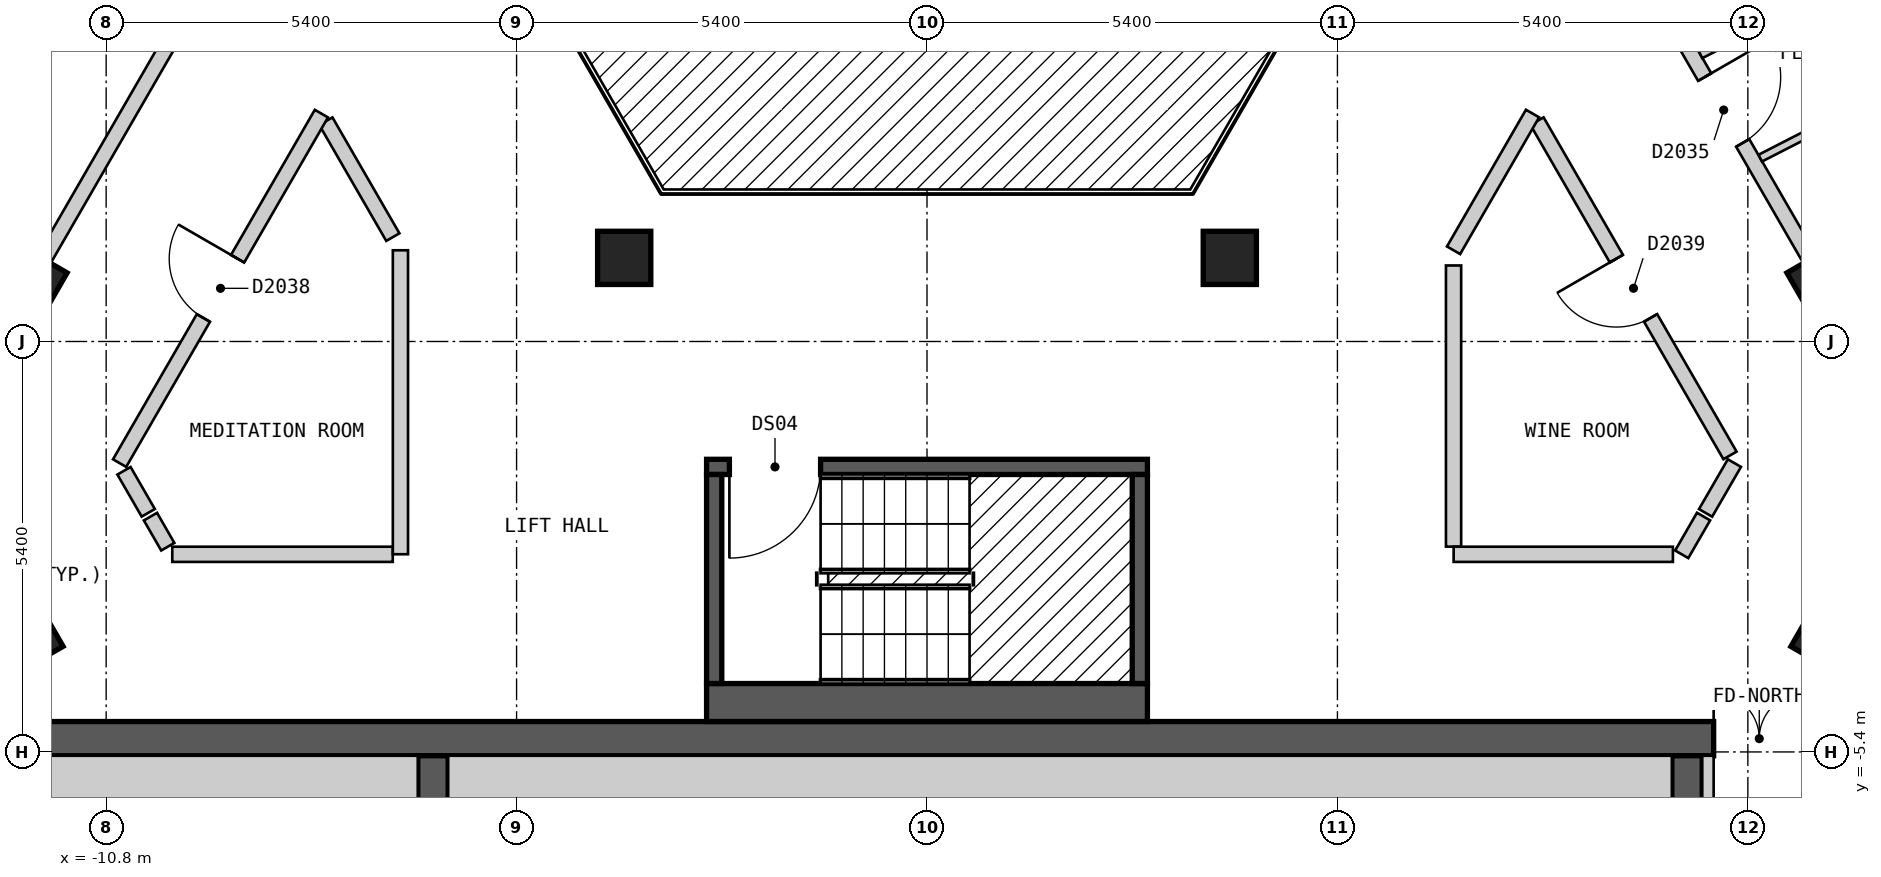
"""IFC4 building model, lengths in metres.
Left out: names, types, materials, properties, quantities, classifications, styles, units other than length and angle.
Written with IfcOpenShell. Run it as: python <this file> out.ifc"""

import sys

from ifc_helpers import new_model, si_unit, direction, frame, frame_2d, origin, origin_2d, place, context, subcontext, project, spatial, rectangle, extrude, element, fill, save


model = new_model("IFC4")
c1 = context("Model", 3, precision=1e-05, world=origin(), true_north=direction((0.0, 1.0)))
c2 = subcontext(c1, "Body", "Model", "MODEL_VIEW")
j1 = project(units=[si_unit("LENGTHUNIT", "METRE"), si_unit("PLANEANGLEUNIT", "RADIAN")], contexts=[c1])
p1 = place(None, origin())
s1 = spatial("IfcSite", under=j1, at=p1, CompositionType="ELEMENT")
p2 = place(p1, origin())
s2 = spatial("IfcBuilding", under=s1, at=p2, CompositionType="ELEMENT")
p3 = place(p2, frame((0.0, 0.0, 238.8)))
s3 = spatial("IfcBuildingStorey", under=s2, at=p3, CompositionType="ELEMENT", Elevation=238.8)
for number, where, z_axis, x_axis in (
    (1, (-11.845, -3.883, 0.0), (0.0, 0.0, 1.0), (0.5, -0.866, 0.0)),
    (2, (11.845, -3.884, 0.0), (0.0, 0.0, 1.0), (0.5, 0.866, 0.0)),
    (3, (11.792, 0.775, 0.0), (0.0, 0.0, 1.0), (-0.5, 0.866, 0.0)),
    (4, (3.984, 1.1, 0.0), (0.0, 0.0, 1.0), (1.0, 0.0, 0.0)),
    (5, (-3.984, 1.1, 0.0), (0.0, 0.0, 1.0), (1.0, 0.0, 0.0)),
    (6, (-11.792, 0.775, 0.0), (0.0, 0.0, 1.0), (-0.5, -0.866, 0.0)),
):
    element("IfcColumn", number, at=place(p3, frame(where, z_axis=z_axis, x_axis=x_axis)), inside=s3, PredefinedType="COLUMN", context=c2, shape_type="SweptSolid", body=[
        extrude(rectangle(XDim=0.7, YDim=0.7, at=origin_2d()), origin(), (0.0, 0.0, 1.0), 3.0),
    ])
p4 = place(p3, frame((-13.3, -5.225, 0.0), z_axis=(0.0, 0.0, 1.0), x_axis=(1.0, 0.0, 0.0)))
e7 = element("IfcWall", 7, at=p4, inside=s3, PredefinedType="SHEAR", context=c2, shape_type="SweptSolid", body=[
    extrude(rectangle(XDim=26.6, YDim=0.45, at=frame_2d((13.3, 0.0))), origin(), (0.0, 0.0, 1.0), 2.7),
])
p5 = place(p4, frame((23.65, 0.0, 0.0)))
e8 = element("IfcOpeningElement", 8, at=p5, cuts=e7, PredefinedType="OPENING", context=c2, shape_type="SweptSolid", body=[
    extrude(rectangle(XDim=1.2, YDim=2.1, at=frame_2d((0.6, 1.05))), frame((0.0, 0.235, 0.0), z_axis=(0.0, -1.0, 0.0), x_axis=(1.0, 0.0, 0.0)), (0.0, 0.0, 1.0), 0.47),
])
for number, where, z_axis, x_axis in (
    (9, (-6.5, -9.15, 0.0), (0.0, 0.0, 1.0), (0.0, 1.0, 0.0)),
    (10, (10.0, -9.15, 0.0), (0.0, 0.0, 1.0), (0.0, 1.0, 0.0)),
):
    element("IfcWall", number, at=place(p3, frame(where, z_axis=z_axis, x_axis=x_axis)), inside=s3, PredefinedType="SHEAR", context=c2, shape_type="SweptSolid", body=[
        extrude(rectangle(XDim=3.7, YDim=0.4, at=frame_2d((1.85, 0.0))), origin(), (0.0, 0.0, 1.0), 2.7),
    ])
p6 = place(p3, frame((-2.9, -4.75, 0.0), z_axis=(0.0, 0.0, 1.0), x_axis=(1.0, 0.0, 0.0)))
e11 = element("IfcWall", 11, at=p6, inside=s3, PredefinedType="SOLIDWALL", context=c2, shape_type="SweptSolid", body=[
    extrude(rectangle(XDim=5.8, YDim=0.5, at=frame_2d((2.9, 0.0))), origin(), (0.0, 0.0, 1.0), 2.7),
])
p7 = place(p3, frame((-2.9, -1.65, 0.0), z_axis=(0.0, 0.0, 1.0), x_axis=(1.0, 0.0, 0.0)))
e12 = element("IfcWall", 12, at=p7, inside=s3, PredefinedType="SOLIDWALL", context=c2, shape_type="SweptSolid", body=[
    extrude(rectangle(XDim=5.8, YDim=0.2, at=frame_2d((2.9, 0.0))), origin(), (0.0, 0.0, 1.0), 2.7),
])
p8 = place(p7, frame((0.3, 0.0, 0.0)))
e13 = element("IfcOpeningElement", 13, at=p8, cuts=e12, PredefinedType="OPENING", context=c2, shape_type="SweptSolid", body=[
    extrude(rectangle(XDim=1.2, YDim=2.1, at=frame_2d((0.6, 1.05))), frame((0.0, 0.11, 0.0), z_axis=(0.0, -1.0, 0.0), x_axis=(1.0, 0.0, 0.0)), (0.0, 0.0, 1.0), 0.22),
])
for number, where, z_axis, x_axis in (
    (14, (-2.8, -4.5, 0.0), (0.0, 0.0, 1.0), (0.0, 1.0, 0.0)),
    (15, (2.8, -4.5, 0.0), (0.0, 0.0, 1.0), (0.0, 1.0, 0.0)),
):
    element("IfcWall", number, at=place(p3, frame(where, z_axis=z_axis, x_axis=x_axis)), inside=s3, PredefinedType="SOLIDWALL", context=c2, shape_type="SweptSolid", body=[
        extrude(rectangle(XDim=2.75, YDim=0.2, at=frame_2d((1.375, 0.0))), origin(), (0.0, 0.0, 1.0), 2.7),
    ])
p9 = place(p3, frame((-7.909, 2.898, 0.0), z_axis=(0.0, 0.0, 1.0), x_axis=(0.50019444547, -0.865913111531, 0.0)))
e16 = element("IfcWall", 16, at=p9, inside=s3, PredefinedType="PARTITIONING", context=c2, shape_type="SweptSolid", body=[
    extrude(rectangle(XDim=1.761, YDim=0.2, at=frame_2d((0.88, 0.0))), origin(), (0.0, 0.0, 1.0), 2.7),
])
p10 = place(p3, frame((-10.565, -1.701, 0.0), z_axis=(0.0, 0.0, 1.0), x_axis=(0.499512735409, -0.866306543416, 0.0)))
e17 = element("IfcWall", 17, at=p10, inside=s3, PredefinedType="PARTITIONING", context=c2, shape_type="SweptSolid", body=[
    extrude(rectangle(XDim=0.638, YDim=0.2, at=frame_2d((0.319, 0.0))), origin(), (0.0, 0.0, 1.0), 2.7),
])
p11 = place(p3, frame((-10.217, -2.304, 0.0), z_axis=(0.0, 0.0, 1.0), x_axis=(0.499013081552, -0.866594452117, 0.0)))
e18 = element("IfcWall", 18, at=p11, inside=s3, PredefinedType="PARTITIONING", context=c2, shape_type="SweptSolid", body=[
    extrude(rectangle(XDim=0.457, YDim=0.2, at=frame_2d((0.229, 0.0))), origin(), (0.0, 0.0, 1.0), 2.7),
])
p12 = place(p3, frame((8.026, 2.899, 0.0), z_axis=(0.0, 0.0, 1.0), x_axis=(0.499986018985, -0.866033475577, 0.0)))
e19 = element("IfcWall", 19, at=p12, inside=s3, PredefinedType="PARTITIONING", context=c2, shape_type="SweptSolid", body=[
    extrude(rectangle(XDim=5.078, YDim=0.2, at=frame_2d((2.539, 0.0))), origin(), (0.0, 0.0, 1.0), 2.7),
])
p13 = place(p12, frame((2.089, 0.0, 0.0)))
e20 = element("IfcOpeningElement", 20, at=p13, cuts=e19, PredefinedType="OPENING", context=c2, shape_type="SweptSolid", body=[
    extrude(rectangle(XDim=0.9, YDim=2.1, at=frame_2d((0.45, 1.05))), frame((0.0, 0.11, 0.0), z_axis=(0.0, -1.0, 0.0), x_axis=(1.0, 0.0, 0.0)), (0.0, 0.0, 1.0), 0.22),
])
p14 = place(p3, frame((9.238, 5.2, 0.0), z_axis=(0.0, 0.0, 1.0), x_axis=(0.500025705601, -0.86601056214, 0.0)))
e21 = element("IfcWall", 21, at=p14, inside=s3, PredefinedType="PARTITIONING", context=c2, shape_type="SweptSolid", body=[
    extrude(rectangle(XDim=7.735, YDim=0.2, at=frame_2d((3.868, 0.0))), origin(), (0.0, 0.0, 1.0), 2.7),
])
p15 = place(p14, frame((6.705, 0.0, 0.0)))
e22 = element("IfcOpeningElement", 22, at=p15, cuts=e21, PredefinedType="OPENING", context=c2, shape_type="SweptSolid", body=[
    extrude(rectangle(XDim=1.0, YDim=2.1, at=frame_2d((0.5, 1.05))), frame((0.0, 0.11, 0.0), z_axis=(0.0, -1.0, 0.0), x_axis=(1.0, 0.0, 0.0)), (0.0, 0.0, 1.0), 0.22),
])
p16 = place(p14, frame((1.988, 0.0, 0.0)))
e23 = element("IfcOpeningElement", 23, at=p16, cuts=e21, PredefinedType="OPENING", context=c2, shape_type="SweptSolid", body=[
    extrude(rectangle(XDim=1.0, YDim=2.1, at=frame_2d((0.5, 1.05))), frame((0.0, 0.11, 0.0), z_axis=(0.0, -1.0, 0.0), x_axis=(1.0, 0.0, 0.0)), (0.0, 0.0, 1.0), 0.22),
])
p17 = place(p3, frame((6.928, 1.0, 0.0), z_axis=(0.0, 0.0, 1.0), x_axis=(0.0, -1.0, 0.0)))
e24 = element("IfcWall", 24, at=p17, inside=s3, PredefinedType="PARTITIONING", context=c2, shape_type="SweptSolid", body=[
    extrude(rectangle(XDim=3.699, YDim=0.2, at=frame_2d((1.85, 0.0))), origin(), (0.0, 0.0, 1.0), 2.7),
])
p18 = place(p3, frame((-9.93, -2.8, 0.0), z_axis=(0.0, 0.0, 1.0), x_axis=(1.0, 0.0, 0.0)))
e25 = element("IfcWall", 25, at=p18, inside=s3, PredefinedType="PARTITIONING", context=c2, shape_type="SweptSolid", body=[
    extrude(rectangle(XDim=2.901, YDim=0.2, at=frame_2d((1.45, 0.0))), origin(), (0.0, 0.0, 1.0), 2.7),
])
p19 = place(p3, frame((6.929, -2.8, 0.0), z_axis=(0.0, 0.0, 1.0), x_axis=(1.0, 0.0, 0.0)))
e26 = element("IfcWall", 26, at=p19, inside=s3, PredefinedType="PARTITIONING", context=c2, shape_type="SweptSolid", body=[
    extrude(rectangle(XDim=2.885, YDim=0.2, at=frame_2d((1.442, 0.0))), origin(), (0.0, 0.0, 1.0), 2.7),
])
p20 = place(p3, frame((6.928, 1.2, 0.0), z_axis=(0.0, 0.0, 1.0), x_axis=(0.500132712588, 0.865948768577, 0.0)))
e27 = element("IfcWall", 27, at=p20, inside=s3, PredefinedType="PARTITIONING", context=c2, shape_type="SweptSolid", body=[
    extrude(rectangle(XDim=2.078, YDim=0.2, at=frame_2d((1.039, 0.0))), origin(), (0.0, 0.0, 1.0), 2.7),
])
p21 = place(p3, frame((9.93, -2.8, 0.0), z_axis=(0.0, 0.0, 1.0), x_axis=(0.500164219654, 0.865930570761, 0.0)))
e28 = element("IfcWall", 28, at=p21, inside=s3, PredefinedType="PARTITIONING", context=c2, shape_type="SweptSolid", body=[
    extrude(rectangle(XDim=0.574, YDim=0.2, at=frame_2d((0.287, 0.0))), origin(), (0.0, 0.0, 1.0), 2.7),
])
p22 = place(p3, frame((10.244, -2.255, 0.0), z_axis=(0.0, 0.0, 1.0), x_axis=(0.50109986513, 0.865389464442, 0.0)))
e29 = element("IfcWall", 29, at=p22, inside=s3, PredefinedType="PARTITIONING", context=c2, shape_type="SweptSolid", body=[
    extrude(rectangle(XDim=0.757, YDim=0.2, at=frame_2d((0.378, 0.0))), origin(), (0.0, 0.0, 1.0), 2.7),
])
p23 = place(p3, frame((-10.623, -1.6, 0.0), z_axis=(0.0, 0.0, 1.0), x_axis=(0.500040865889, 0.866001808567, 0.0)))
e30 = element("IfcWall", 30, at=p23, inside=s3, PredefinedType="PARTITIONING", context=c2, shape_type="SweptSolid", body=[
    extrude(rectangle(XDim=5.31, YDim=0.2, at=frame_2d((2.655, 0.0))), origin(), (0.0, 0.0, 1.0), 2.7),
])
p24 = place(p23, frame((2.205, 0.0, 0.0)))
e31 = element("IfcOpeningElement", 31, at=p24, cuts=e30, PredefinedType="OPENING", context=c2, shape_type="SweptSolid", body=[
    extrude(rectangle(XDim=0.9, YDim=2.1, at=frame_2d((0.45, 1.05))), frame((0.0, 0.11, 0.0), z_axis=(0.0, -1.0, 0.0), x_axis=(1.0, 0.0, 0.0)), (0.0, 0.0, 1.0), 0.22),
])
p25 = place(p3, frame((-13.106, -1.5, 0.0), z_axis=(0.0, 0.0, 1.0), x_axis=(0.500025705601, 0.86601056214, 0.0)))
e32 = element("IfcWall", 32, at=p25, inside=s3, PredefinedType="PARTITIONING", context=c2, shape_type="SweptSolid", body=[
    extrude(rectangle(XDim=7.735, YDim=0.2, at=frame_2d((3.868, 0.0))), origin(), (0.0, 0.0, 1.0), 2.7),
])
p26 = place(p3, frame((-6.928, -2.799, 0.0), z_axis=(0.0, 0.0, 1.0), x_axis=(0.0, 1.0, 0.0)))
e33 = element("IfcWall", 33, at=p26, inside=s3, PredefinedType="PARTITIONING", context=c2, shape_type="SweptSolid", body=[
    extrude(rectangle(XDim=3.999, YDim=0.2, at=frame_2d((2.0, 0.0))), origin(), (0.0, 0.0, 1.0), 2.7),
])
p27 = place(p3, frame((10.178, 3.772, 0.0), z_axis=(0.0, 0.0, 1.0), x_axis=(0.889829844516, 0.456292502467, 0.0)))
e34 = element("IfcWall", 34, at=p27, inside=s3, PredefinedType="PARTITIONING", context=c2, shape_type="SweptSolid", body=[
    extrude(rectangle(XDim=3.079, YDim=0.1, at=frame_2d((1.54, 0.0))), origin(), (0.0, 0.0, 1.0), 2.7),
])
p28 = place(p27, frame((1.115, 0.0, 0.0)))
e35 = element("IfcOpeningElement", 35, at=p28, cuts=e34, PredefinedType="OPENING", context=c2, shape_type="SweptSolid", body=[
    extrude(rectangle(XDim=0.8, YDim=2.1, at=frame_2d((0.4, 1.05))), frame((0.0, 0.06, 0.0), z_axis=(0.0, -1.0, 0.0), x_axis=(1.0, 0.0, 0.0)), (0.0, 0.0, 1.0), 0.12),
])
p29 = place(p3, frame((10.963, 2.412, 0.0), z_axis=(0.0, 0.0, 1.0), x_axis=(0.890014850977, 0.455931535475, 0.0)))
e36 = element("IfcWall", 36, at=p29, inside=s3, PredefinedType="PARTITIONING", context=c2, shape_type="SweptSolid", body=[
    extrude(rectangle(XDim=3.051, YDim=0.1, at=frame_2d((1.525, 0.0))), origin(), (0.0, 0.0, 1.0), 2.7),
])
p30 = place(p29, frame((1.026, 0.0, 0.0)))
e37 = element("IfcOpeningElement", 37, at=p30, cuts=e36, PredefinedType="OPENING", context=c2, shape_type="SweptSolid", body=[
    extrude(rectangle(XDim=0.9, YDim=2.1, at=frame_2d((0.45, 1.05))), frame((0.0, 0.06, 0.0), z_axis=(0.0, -1.0, 0.0), x_axis=(1.0, 0.0, 0.0)), (0.0, 0.0, 1.0), 0.12),
])
p31 = place(p3, frame((-12.1, -5.825, 0.0), z_axis=(0.0, 0.0, 1.0), x_axis=(1.0, 0.0, 0.0)))
e38 = element("IfcWall", 38, at=p31, inside=s3, PredefinedType="SOLIDWALL", context=c2, shape_type="SweptSolid", body=[
    extrude(rectangle(XDim=5.4, YDim=0.75, at=frame_2d((2.7, 0.0))), origin(), (0.0, 0.0, 1.0), 2.7),
])
p32 = place(p3, frame((-6.3, -5.825, 0.0), z_axis=(0.0, 0.0, 1.0), x_axis=(1.0, 0.0, 0.0)))
e39 = element("IfcWall", 39, at=p32, inside=s3, PredefinedType="SOLIDWALL", context=c2, shape_type="SweptSolid", body=[
    extrude(rectangle(XDim=16.1, YDim=0.75, at=frame_2d((8.05, 0.0))), origin(), (0.0, 0.0, 1.0), 2.7),
])
p33 = place(p3, frame((10.275, -6.2, 0.0), z_axis=(0.0, 0.0, 1.0), x_axis=(0.0, 1.0, 0.0)))
e40 = element("IfcWall", 40, at=p33, inside=s3, PredefinedType="PARTITIONING", context=c2, shape_type="SweptSolid", body=[
    extrude(rectangle(XDim=0.75, YDim=0.15, at=frame_2d((0.375, 0.0))), origin(), (0.0, 0.0, 1.0), 2.7),
])
p34 = place(p8, origin())
e41 = element("IfcDoor", 41, at=p34, inside=s3, OperationType="SINGLE_SWING_LEFT", PredefinedType="DOOR", context=c2, shape_type="SweptSolid", body=[
    extrude(rectangle(XDim=1.2, YDim=2.1, at=frame_2d((0.6, 1.05))), frame((0.0, 0.025, 0.0), z_axis=(0.0, -1.0, 0.0), x_axis=(1.0, 0.0, 0.0)), (0.0, 0.0, 1.0), 0.05),
])
fill(e13, e41)
p35 = place(p16, origin())
e42 = element("IfcDoor", 42, at=p35, inside=s3, OperationType="SINGLE_SWING_LEFT", PredefinedType="DOOR", context=c2, shape_type="SweptSolid", body=[
    extrude(rectangle(XDim=1.0, YDim=2.1, at=frame_2d((0.5, 1.05))), frame((0.0, 0.025, 0.0), z_axis=(0.0, -1.0, 0.0), x_axis=(1.0, 0.0, 0.0)), (0.0, 0.0, 1.0), 0.05),
])
fill(e23, e42)
p36 = place(p24, origin())
e43 = element("IfcDoor", 43, at=p36, inside=s3, OperationType="SINGLE_SWING_RIGHT", PredefinedType="DOOR", context=c2, shape_type="SweptSolid", body=[
    extrude(rectangle(XDim=0.9, YDim=2.1, at=frame_2d((0.45, 1.05))), frame((0.0, 0.025, 0.0), z_axis=(0.0, -1.0, 0.0), x_axis=(1.0, 0.0, 0.0)), (0.0, 0.0, 1.0), 0.05),
])
fill(e31, e43)
p37 = place(p13, origin())
e44 = element("IfcDoor", 44, at=p37, inside=s3, OperationType="SINGLE_SWING_LEFT", PredefinedType="DOOR", context=c2, shape_type="SweptSolid", body=[
    extrude(rectangle(XDim=0.9, YDim=2.1, at=frame_2d((0.45, 1.05))), frame((0.0, 0.025, 0.0), z_axis=(0.0, -1.0, 0.0), x_axis=(1.0, 0.0, 0.0)), (0.0, 0.0, 1.0), 0.05),
])
fill(e20, e44)
p38 = place(p5, origin())
e45 = element("IfcDoor", 45, at=p38, inside=s3, OperationType="DOUBLE_DOOR_SINGLE_SWING", PredefinedType="DOOR", context=c2, shape_type="SweptSolid", body=[
    extrude(rectangle(XDim=1.2, YDim=2.1, at=frame_2d((0.6, 1.05))), frame((0.0, 0.025, 0.0), z_axis=(0.0, -1.0, 0.0), x_axis=(1.0, 0.0, 0.0)), (0.0, 0.0, 1.0), 0.05),
])
fill(e8, e45)
save(model, sys.argv[1])
